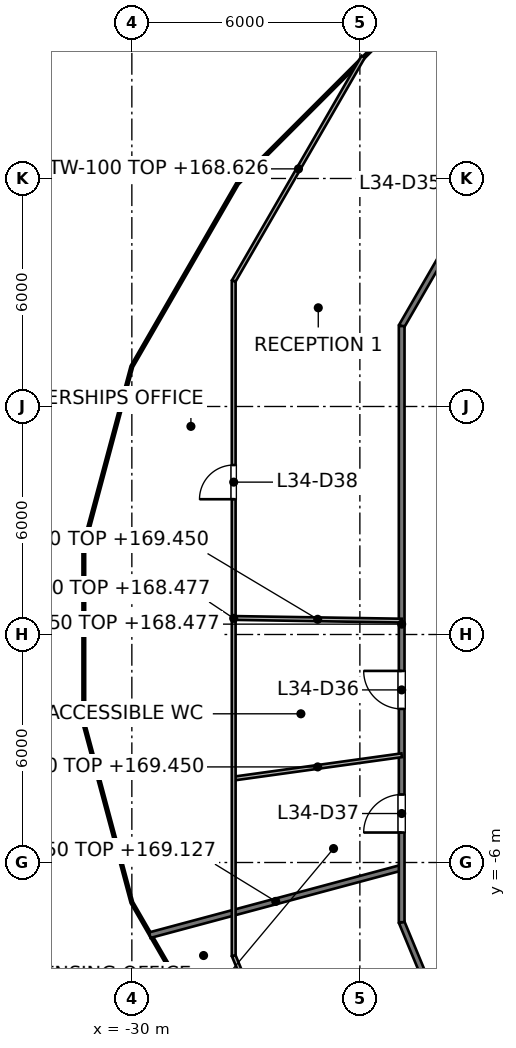
"""IFC4 building model, lengths in metres.
Left out: names, types, materials, properties, quantities, classifications, styles, units other than length and angle.
Written with IfcOpenShell. Run it as: python <this file> out.ifc"""

import sys

from ifc_helpers import new_model, si_unit, direction, frame, frame_2d, origin, place, context, subcontext, project, spatial, rectangle, extrude, element, fill, save


model = new_model("IFC4")
c1 = context("Model", 3, precision=1e-05, world=origin(), true_north=direction((0.0, 1.0)))
c2 = subcontext(c1, "Body", "Model", "MODEL_VIEW")
j1 = project(units=[si_unit("LENGTHUNIT", "METRE"), si_unit("PLANEANGLEUNIT", "RADIAN")], contexts=[c1])
p1 = place(None, origin())
s1 = spatial("IfcSite", under=j1, at=p1, CompositionType="ELEMENT")
p2 = place(p1, origin())
s2 = spatial("IfcBuilding", under=s1, at=p2, CompositionType="ELEMENT")
p3 = place(p2, frame((0.0, 0.0, 165.6)))
s3 = spatial("IfcBuildingStorey", under=s2, at=p3, CompositionType="ELEMENT", Elevation=165.6)
p4 = place(p3, frame((-22.9, -7.572, 0.0), z_axis=(0.0, 0.0, 1.0), x_axis=(0.382860357704, -0.923806227788, 0.0)))
e1 = element("IfcWall", 1, at=p4, inside=s3, PredefinedType="PARTITIONING", context=c2, shape_type="SweptSolid", body=[
    extrude(rectangle(XDim=6.374, YDim=0.15, at=frame_2d((3.187, 0.0))), origin(), (0.0, 0.0, 1.0), 3.076),
])
p5 = place(p4, frame((2.638, 0.0, 0.0)))
e2 = element("IfcOpeningElement", 2, at=p5, cuts=e1, PredefinedType="OPENING", context=c2, shape_type="SweptSolid", body=[
    extrude(rectangle(XDim=1.0, YDim=2.1, at=frame_2d((0.5, 1.05))), frame((0.0, 0.075, 0.0), z_axis=(0.0, -1.0, 0.0), x_axis=(1.0, 0.0, 0.0)), (0.0, 0.0, 1.0), 0.15),
])
p6 = place(p3, frame((-29.528, -7.912, 0.0), z_axis=(0.0, 0.0, 1.0), x_axis=(0.965910567046, 0.258875986659, 0.0)))
e3 = element("IfcWall", 3, at=p6, inside=s3, PredefinedType="PARTITIONING", context=c2, shape_type="SweptSolid", body=[
    extrude(rectangle(XDim=6.862, YDim=0.15, at=frame_2d((3.431, 0.0))), origin(), (0.0, 0.0, 1.0), 3.527),
])
p7 = place(p3, frame((-22.9, 8.117, 0.0), z_axis=(0.0, 0.0, 1.0), x_axis=(0.500017275495, 0.866015429543, 0.0)))
e4 = element("IfcWall", 4, at=p7, inside=s3, PredefinedType="PARTITIONING", context=c2, shape_type="SweptSolid", body=[
    extrude(rectangle(XDim=8.626, YDim=0.15, at=frame_2d((4.313, 0.0))), origin(), (0.0, 0.0, 1.0), 2.877),
])
p8 = place(p7, frame((3.713, 0.0, 0.0)))
e5 = element("IfcOpeningElement", 5, at=p8, cuts=e4, PredefinedType="OPENING", context=c2, shape_type="SweptSolid", body=[
    extrude(rectangle(XDim=1.2, YDim=2.1, at=frame_2d((0.6, 1.05))), frame((0.0, 0.075, 0.0), z_axis=(0.0, -1.0, 0.0), x_axis=(1.0, 0.0, 0.0)), (0.0, 0.0, 1.0), 0.15),
])
p9 = place(p3, frame((-22.9, -7.572, 0.0), z_axis=(0.0, 0.0, 1.0), x_axis=(0.0, 1.0, 0.0)))
e6 = element("IfcWall", 6, at=p9, inside=s3, PredefinedType="PARTITIONING", context=c2, shape_type="SweptSolid", body=[
    extrude(rectangle(XDim=15.689, YDim=0.15, at=frame_2d((7.844, 0.0))), origin(), (0.0, 0.0, 1.0), 2.877),
])
p10 = place(p9, frame((5.614, 0.0, 0.0)))
e7 = element("IfcOpeningElement", 7, at=p10, cuts=e6, PredefinedType="OPENING", context=c2, shape_type="SweptSolid", body=[
    extrude(rectangle(XDim=1.0, YDim=2.1, at=frame_2d((0.5, 1.05))), frame((0.0, 0.075, 0.0), z_axis=(0.0, -1.0, 0.0), x_axis=(1.0, 0.0, 0.0)), (0.0, 0.0, 1.0), 0.15),
])
p11 = place(p9, frame((2.361, 0.0, 0.0)))
e8 = element("IfcOpeningElement", 8, at=p11, cuts=e6, PredefinedType="OPENING", context=c2, shape_type="SweptSolid", body=[
    extrude(rectangle(XDim=1.0, YDim=2.1, at=frame_2d((0.5, 1.05))), frame((0.0, 0.075, 0.0), z_axis=(0.0, -1.0, 0.0), x_axis=(1.0, 0.0, 0.0)), (0.0, 0.0, 1.0), 0.15),
])
p12 = place(p3, frame((-27.32, -8.452, 0.0), z_axis=(0.0, 0.0, 1.0), x_axis=(0.382783190585, -0.923838204993, 0.0)))
e9 = element("IfcWall", 9, at=p12, inside=s3, PredefinedType="PARTITIONING", context=c2, shape_type="SweptSolid", body=[
    extrude(rectangle(XDim=6.181, YDim=0.1, at=frame_2d((3.09, 0.0))), origin(), (0.0, 0.0, 1.0), 3.076),
])
p13 = place(p12, frame((0.6, 0.0, 0.0)))
e10 = element("IfcOpeningElement", 10, at=p13, cuts=e9, PredefinedType="OPENING", context=c2, shape_type="SweptSolid", body=[
    extrude(rectangle(XDim=0.9, YDim=2.1, at=frame_2d((0.45, 1.05))), frame((0.0, 0.05, 0.0), z_axis=(0.0, -1.0, 0.0), x_axis=(1.0, 0.0, 0.0)), (0.0, 0.0, 1.0), 0.1),
])
p14 = place(p3, frame((-27.32, 0.435, 0.0), z_axis=(0.0, 0.0, 1.0), x_axis=(0.999874381125, -0.015849983285, 0.0)))
e11 = element("IfcWall", 11, at=p14, inside=s3, PredefinedType="PARTITIONING", context=c2, shape_type="SweptSolid", body=[
    extrude(rectangle(XDim=4.421, YDim=0.1, at=frame_2d((2.21, 0.0))), origin(), (0.0, 0.0, 1.0), 3.85),
])
p15 = place(p3, frame((-27.32, -3.791, 0.0), z_axis=(0.0, 0.0, 1.0), x_axis=(0.990518967412, 0.137376035745, 0.0)))
e12 = element("IfcWall", 12, at=p15, inside=s3, PredefinedType="PARTITIONING", context=c2, shape_type="SweptSolid", body=[
    extrude(rectangle(XDim=4.462, YDim=0.1, at=frame_2d((2.231, 0.0))), origin(), (0.0, 0.0, 1.0), 3.85),
])
p16 = place(p3, frame((-27.32, 9.301, 0.0), z_axis=(0.0, 0.0, 1.0), x_axis=(0.500025204458, 0.866010851495, 0.0)))
e13 = element("IfcWall", 13, at=p16, inside=s3, PredefinedType="PARTITIONING", context=c2, shape_type="SweptSolid", body=[
    extrude(rectangle(XDim=6.818, YDim=0.1, at=frame_2d((3.409, 0.0))), origin(), (0.0, 0.0, 1.0), 3.026),
])
p17 = place(p3, frame((-27.32, -8.452, 0.0), z_axis=(0.0, 0.0, 1.0), x_axis=(0.0, 1.0, 0.0)))
e14 = element("IfcWall", 14, at=p17, inside=s3, PredefinedType="PARTITIONING", context=c2, shape_type="SweptSolid", body=[
    extrude(rectangle(XDim=17.753, YDim=0.1, at=frame_2d((8.876, 0.0))), origin(), (0.0, 0.0, 1.0), 2.877),
])
p18 = place(p17, frame((12.012, 0.0, 0.0)))
e15 = element("IfcOpeningElement", 15, at=p18, cuts=e14, PredefinedType="OPENING", context=c2, shape_type="SweptSolid", body=[
    extrude(rectangle(XDim=0.9, YDim=2.1, at=frame_2d((0.45, 1.05))), frame((0.0, 0.05, 0.0), z_axis=(0.0, -1.0, 0.0), x_axis=(1.0, 0.0, 0.0)), (0.0, 0.0, 1.0), 0.1),
])
p19 = place(p10, origin())
e16 = element("IfcDoor", 16, at=p19, inside=s3, OperationType="SINGLE_SWING_RIGHT", PredefinedType="DOOR", context=c2, shape_type="SweptSolid", body=[
    extrude(rectangle(XDim=1.0, YDim=2.1, at=frame_2d((0.5, 1.05))), frame((0.0, 0.025, 0.0), z_axis=(0.0, -1.0, 0.0), x_axis=(1.0, 0.0, 0.0)), (0.0, 0.0, 1.0), 0.05),
])
fill(e7, e16)
p20 = place(p11, origin())
e17 = element("IfcDoor", 17, at=p20, inside=s3, OperationType="SINGLE_SWING_LEFT", PredefinedType="DOOR", context=c2, shape_type="SweptSolid", body=[
    extrude(rectangle(XDim=1.0, YDim=2.1, at=frame_2d((0.5, 1.05))), frame((0.0, 0.025, 0.0), z_axis=(0.0, -1.0, 0.0), x_axis=(1.0, 0.0, 0.0)), (0.0, 0.0, 1.0), 0.05),
])
fill(e8, e17)
p21 = place(p18, origin())
e18 = element("IfcDoor", 18, at=p21, inside=s3, OperationType="SINGLE_SWING_LEFT", PredefinedType="DOOR", context=c2, shape_type="SweptSolid", body=[
    extrude(rectangle(XDim=0.9, YDim=2.1, at=frame_2d((0.45, 1.05))), frame((0.0, 0.025, 0.0), z_axis=(0.0, -1.0, 0.0), x_axis=(1.0, 0.0, 0.0)), (0.0, 0.0, 1.0), 0.05),
])
fill(e15, e18)
save(model, sys.argv[1])
